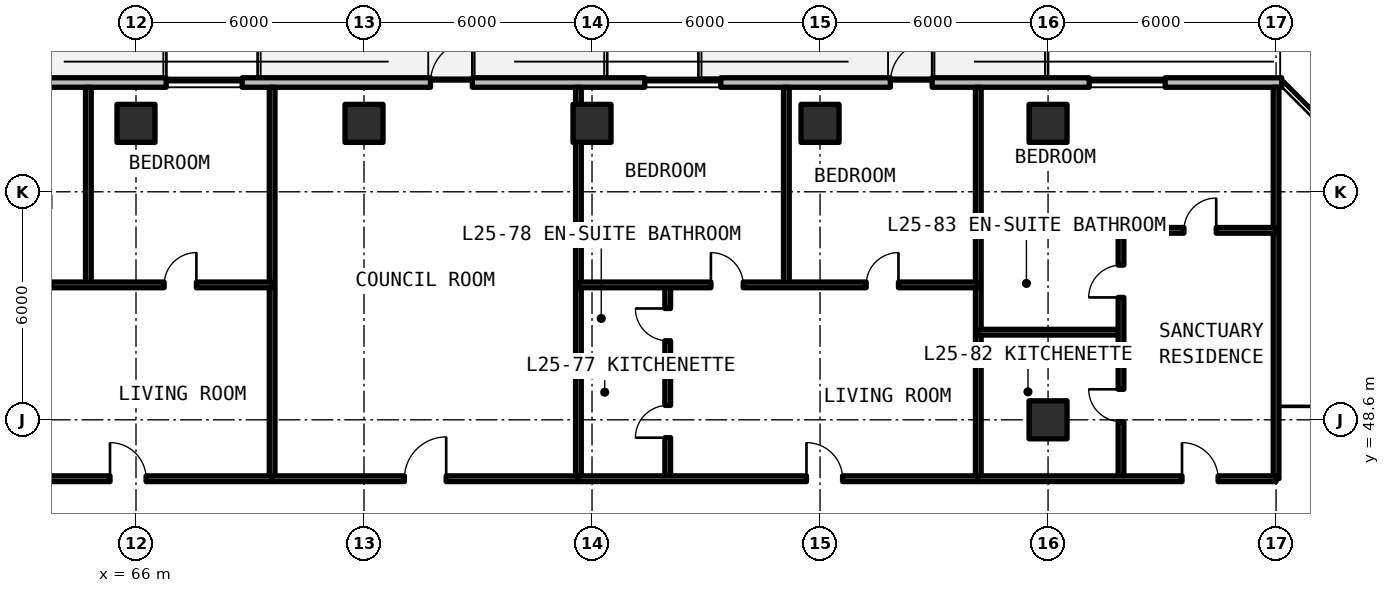
"""IFC4 building model, lengths in metres.
Left out: names, types, materials, properties, quantities, classifications, styles, units other than length and angle.
Written with IfcOpenShell. Run it as: python <this file> out.ifc"""

import sys

from ifc_helpers import new_model, si_unit, direction, frame, frame_2d, origin, origin_2d, place, context, subcontext, project, spatial, rectangle, extrude, element, fill, save


model = new_model("IFC4")
c1 = context("Model", 3, precision=1e-05, world=origin(), true_north=direction((0.0, 1.0)))
c2 = subcontext(c1, "Body", "Model", "MODEL_VIEW")
j1 = project(units=[si_unit("LENGTHUNIT", "METRE"), si_unit("PLANEANGLEUNIT", "RADIAN")], contexts=[c1])
p1 = place(None, origin())
s1 = spatial("IfcSite", under=j1, at=p1, CompositionType="ELEMENT")
p2 = place(p1, origin())
s2 = spatial("IfcBuilding", under=s1, at=p2, CompositionType="ELEMENT")
p3 = place(p2, frame((0.0, 0.0, 92.07)))
s3 = spatial("IfcBuildingStorey", under=s2, at=p3, CompositionType="ELEMENT", Elevation=92.07)
for number, where, z_axis, x_axis in (
    (1, (90.0, 48.6, 0.0), (0.0, 0.0, 1.0), (1.0, 0.0, 0.0)),
    (2, (66.0, 56.4, 0.0), (0.0, 0.0, 1.0), (1.0, 0.0, 0.0)),
    (3, (72.0, 56.4, 0.0), (0.0, 0.0, 1.0), (1.0, 0.0, 0.0)),
    (4, (78.0, 56.4, 0.0), (0.0, 0.0, 1.0), (1.0, 0.0, 0.0)),
    (5, (84.0, 56.4, 0.0), (0.0, 0.0, 1.0), (1.0, 0.0, 0.0)),
    (6, (90.0, 56.4, 0.0), (0.0, 0.0, 1.0), (1.0, 0.0, 0.0)),
):
    element("IfcColumn", number, at=place(p3, frame(where, z_axis=z_axis, x_axis=x_axis)), inside=s3, PredefinedType="COLUMN", context=c2, shape_type="SweptSolid", body=[
        extrude(rectangle(XDim=1.0, YDim=1.0, at=origin_2d()), origin(), (0.0, 0.0, 1.0), 3.3),
    ])
p4 = place(p3, frame((96.148, 57.475, 0.0), z_axis=(0.0, 0.0, 1.0), x_axis=(-1.0, 0.0, 0.0)))
e7 = element("IfcWall", 7, at=p4, inside=s3, PredefinedType="SOLIDWALL", context=c2, shape_type="SweptSolid", body=[
    extrude(rectangle(XDim=44.023, YDim=0.25, at=frame_2d((22.012, 0.0))), origin(), (0.0, 0.0, 1.0), 3.08),
])
p5 = place(p4, frame((33.148, 0.0, 0.0)))
e8 = element("IfcOpeningElement", 8, at=p5, cuts=e7, PredefinedType="OPENING", context=c2, shape_type="SweptSolid", body=[
    extrude(rectangle(XDim=1.1, YDim=2.15, at=frame_2d((0.55, 1.075))), frame((0.0, 0.135, 0.0), z_axis=(0.0, -1.0, 0.0), x_axis=(1.0, 0.0, 0.0)), (0.0, 0.0, 1.0), 0.27),
])
p6 = place(p4, frame((21.298, 0.0, 0.0)))
e9 = element("IfcOpeningElement", 9, at=p6, cuts=e7, PredefinedType="OPENING", context=c2, shape_type="SweptSolid", body=[
    extrude(rectangle(XDim=1.1, YDim=2.15, at=frame_2d((0.55, 1.075))), frame((0.0, 0.135, 0.0), z_axis=(0.0, -1.0, 0.0), x_axis=(1.0, 0.0, 0.0)), (0.0, 0.0, 1.0), 0.27),
])
p7 = place(p4, frame((9.198, 0.0, 0.0)))
e10 = element("IfcOpeningElement", 10, at=p7, cuts=e7, PredefinedType="OPENING", context=c2, shape_type="SweptSolid", body=[
    extrude(rectangle(XDim=1.1, YDim=2.15, at=frame_2d((0.55, 1.075))), frame((0.0, 0.135, 0.0), z_axis=(0.0, -1.0, 0.0), x_axis=(1.0, 0.0, 0.0)), (0.0, 0.0, 1.0), 0.27),
])
p8 = place(p4, frame((39.334, 0.0, 0.78)))
e11 = element("IfcOpeningElement", 11, at=p8, cuts=e7, PredefinedType="OPENING", context=c2, shape_type="SweptSolid", body=[
    extrude(rectangle(XDim=2.0, YDim=1.66, at=frame_2d((1.0, 0.83))), frame((0.0, 0.135, 0.0), z_axis=(0.0, -1.0, 0.0), x_axis=(1.0, 0.0, 0.0)), (0.0, 0.0, 1.0), 0.27),
])
p9 = place(p4, frame((27.354, 0.0, 0.78)))
e12 = element("IfcOpeningElement", 12, at=p9, cuts=e7, PredefinedType="OPENING", context=c2, shape_type="SweptSolid", body=[
    extrude(rectangle(XDim=2.0, YDim=1.66, at=frame_2d((1.0, 0.83))), frame((0.0, 0.135, 0.0), z_axis=(0.0, -1.0, 0.0), x_axis=(1.0, 0.0, 0.0)), (0.0, 0.0, 1.0), 0.27),
])
p10 = place(p4, frame((14.76, 0.0, 0.78)))
e13 = element("IfcOpeningElement", 13, at=p10, cuts=e7, PredefinedType="OPENING", context=c2, shape_type="SweptSolid", body=[
    extrude(rectangle(XDim=2.0, YDim=1.66, at=frame_2d((1.0, 0.83))), frame((0.0, 0.135, 0.0), z_axis=(0.0, -1.0, 0.0), x_axis=(1.0, 0.0, 0.0)), (0.0, 0.0, 1.0), 0.27),
])
p11 = place(p4, frame((3.066, 0.0, 0.78)))
e14 = element("IfcOpeningElement", 14, at=p11, cuts=e7, PredefinedType="OPENING", context=c2, shape_type="SweptSolid", body=[
    extrude(rectangle(XDim=2.0, YDim=1.66, at=frame_2d((1.0, 0.83))), frame((0.0, 0.135, 0.0), z_axis=(0.0, -1.0, 0.0), x_axis=(1.0, 0.0, 0.0)), (0.0, 0.0, 1.0), 0.27),
])
for number, where, z_axis, x_axis in (
    (15, (96.0, 47.05, 0.0), (0.0, 0.0, 1.0), (0.0, 1.0, 0.0)),
    (16, (69.583, 47.05, 0.0), (0.0, 0.0, 1.0), (0.0, 1.0, 0.0)),
):
    element("IfcWall", number, at=place(p3, frame(where, z_axis=z_axis, x_axis=x_axis)), inside=s3, PredefinedType="SOLIDWALL", context=c2, shape_type="SweptSolid", body=[
        extrude(rectangle(XDim=10.3, YDim=0.15, at=frame_2d((5.15, 0.0))), origin(), (0.0, 0.0, 1.0), 2.35),
    ])
p12 = place(p3, frame((64.747, 52.15, 0.0), z_axis=(0.0, 0.0, 1.0), x_axis=(0.0, 1.0, 0.0)))
e17 = element("IfcWall", 17, at=p12, inside=s3, PredefinedType="PARTITIONING", context=c2, shape_type="SweptSolid", body=[
    extrude(rectangle(XDim=5.2, YDim=0.15, at=frame_2d((2.6, 0.0))), origin(), (0.0, 0.0, 1.0), 2.35),
])
p13 = place(p3, frame((59.508, 52.15, 0.0), z_axis=(0.0, 0.0, 1.0), x_axis=(1.0, 0.0, 0.0)))
e18 = element("IfcWall", 18, at=p13, inside=s3, PredefinedType="PARTITIONING", context=c2, shape_type="SweptSolid", body=[
    extrude(rectangle(XDim=10.074, YDim=0.15, at=frame_2d((5.037, 0.0))), origin(), (0.0, 0.0, 1.0), 2.35),
])
p14 = place(p13, frame((3.4, 0.0, 0.0)))
e19 = element("IfcOpeningElement", 19, at=p14, cuts=e18, PredefinedType="OPENING", context=c2, shape_type="SweptSolid", body=[
    extrude(rectangle(XDim=0.85, YDim=2.1, at=frame_2d((0.425, 1.05))), frame((0.0, 0.085, 0.0), z_axis=(0.0, -1.0, 0.0), x_axis=(1.0, 0.0, 0.0)), (0.0, 0.0, 1.0), 0.17),
])
p15 = place(p13, frame((7.232, 0.0, 0.0)))
e20 = element("IfcOpeningElement", 20, at=p15, cuts=e18, PredefinedType="OPENING", context=c2, shape_type="SweptSolid", body=[
    extrude(rectangle(XDim=0.85, YDim=2.1, at=frame_2d((0.425, 1.05))), frame((0.0, 0.085, 0.0), z_axis=(0.0, -1.0, 0.0), x_axis=(1.0, 0.0, 0.0)), (0.0, 0.0, 1.0), 0.17),
])
p16 = place(p3, frame((59.508, 47.05, 0.0), z_axis=(0.0, 0.0, 1.0), x_axis=(1.0, 0.0, 0.0)))
e21 = element("IfcWall", 21, at=p16, inside=s3, PredefinedType="SOLIDWALL", context=c2, shape_type="SweptSolid", body=[
    extrude(rectangle(XDim=10.074, YDim=0.15, at=frame_2d((5.037, 0.0))), origin(), (0.0, 0.0, 1.0), 2.35),
])
p17 = place(p16, frame((5.808, 0.0, 0.0)))
e22 = element("IfcOpeningElement", 22, at=p17, cuts=e21, PredefinedType="OPENING", context=c2, shape_type="SweptSolid", body=[
    extrude(rectangle(XDim=0.95, YDim=2.15, at=frame_2d((0.475, 1.075))), frame((0.0, 0.085, 0.0), z_axis=(0.0, -1.0, 0.0), x_axis=(1.0, 0.0, 0.0)), (0.0, 0.0, 1.0), 0.17),
])
p18 = place(p3, frame((77.642, 47.05, 0.0), z_axis=(0.0, 0.0, 1.0), x_axis=(0.0, 1.0, 0.0)))
e23 = element("IfcWall", 23, at=p18, inside=s3, PredefinedType="SOLIDWALL", context=c2, shape_type="SweptSolid", body=[
    extrude(rectangle(XDim=10.3, YDim=0.15, at=frame_2d((5.15, 0.0))), origin(), (0.0, 0.0, 1.0), 2.35),
])
p19 = place(p3, frame((69.583, 47.05, 0.0), z_axis=(0.0, 0.0, 1.0), x_axis=(1.0, 0.0, 0.0)))
e24 = element("IfcWall", 24, at=p19, inside=s3, PredefinedType="SOLIDWALL", context=c2, shape_type="SweptSolid", body=[
    extrude(rectangle(XDim=8.06, YDim=0.15, at=frame_2d((4.03, 0.0))), origin(), (0.0, 0.0, 1.0), 2.35),
])
p20 = place(p19, frame((3.48, 0.0, 0.0)))
e25 = element("IfcOpeningElement", 25, at=p20, cuts=e24, PredefinedType="OPENING", context=c2, shape_type="SweptSolid", body=[
    extrude(rectangle(XDim=1.1, YDim=2.15, at=frame_2d((0.55, 1.075))), frame((0.0, 0.085, 0.0), z_axis=(0.0, -1.0, 0.0), x_axis=(1.0, 0.0, 0.0)), (0.0, 0.0, 1.0), 0.17),
])
p21 = place(p3, frame((88.164, 47.05, 0.0), z_axis=(0.0, 0.0, 1.0), x_axis=(0.0, 1.0, 0.0)))
e26 = element("IfcWall", 26, at=p21, inside=s3, PredefinedType="SOLIDWALL", context=c2, shape_type="SweptSolid", body=[
    extrude(rectangle(XDim=10.3, YDim=0.15, at=frame_2d((5.15, 0.0))), origin(), (0.0, 0.0, 1.0), 2.35),
])
p22 = place(p3, frame((77.642, 50.059, 0.0), z_axis=(0.0, 0.0, 1.0), x_axis=(1.0, 0.0, 0.0)))
e27 = element("IfcWall", 27, at=p22, inside=s3, PredefinedType="PARTITIONING", context=c2, shape_type="SweptSolid", body=[
    extrude(rectangle(XDim=2.35, YDim=0.15, at=frame_2d((1.175, 0.0))), origin(), (0.0, 0.0, 1.0), 2.35),
])
p23 = place(p3, frame((79.992, 47.05, 0.0), z_axis=(0.0, 0.0, 1.0), x_axis=(0.0, 1.0, 0.0)))
e28 = element("IfcWall", 28, at=p23, inside=s3, PredefinedType="PARTITIONING", context=c2, shape_type="SweptSolid", body=[
    extrude(rectangle(XDim=5.1, YDim=0.15, at=frame_2d((2.55, 0.0))), origin(), (0.0, 0.0, 1.0), 2.35),
])
p24 = place(p23, frame((1.08, 0.0, 0.0)))
e29 = element("IfcOpeningElement", 29, at=p24, cuts=e28, PredefinedType="OPENING", context=c2, shape_type="SweptSolid", body=[
    extrude(rectangle(XDim=0.85, YDim=2.1, at=frame_2d((0.425, 1.05))), frame((0.0, 0.085, 0.0), z_axis=(0.0, -1.0, 0.0), x_axis=(1.0, 0.0, 0.0)), (0.0, 0.0, 1.0), 0.17),
])
p25 = place(p23, frame((3.629, 0.0, 0.0)))
e30 = element("IfcOpeningElement", 30, at=p25, cuts=e28, PredefinedType="OPENING", context=c2, shape_type="SweptSolid", body=[
    extrude(rectangle(XDim=0.85, YDim=2.1, at=frame_2d((0.425, 1.05))), frame((0.0, 0.085, 0.0), z_axis=(0.0, -1.0, 0.0), x_axis=(1.0, 0.0, 0.0)), (0.0, 0.0, 1.0), 0.17),
])
p26 = place(p3, frame((83.114, 52.15, 0.0), z_axis=(0.0, 0.0, 1.0), x_axis=(0.0, 1.0, 0.0)))
e31 = element("IfcWall", 31, at=p26, inside=s3, PredefinedType="PARTITIONING", context=c2, shape_type="SweptSolid", body=[
    extrude(rectangle(XDim=5.2, YDim=0.15, at=frame_2d((2.6, 0.0))), origin(), (0.0, 0.0, 1.0), 2.35),
])
p27 = place(p3, frame((77.642, 52.15, 0.0), z_axis=(0.0, 0.0, 1.0), x_axis=(1.0, 0.0, 0.0)))
e32 = element("IfcWall", 32, at=p27, inside=s3, PredefinedType="PARTITIONING", context=c2, shape_type="SweptSolid", body=[
    extrude(rectangle(XDim=10.522, YDim=0.15, at=frame_2d((5.261, 0.0))), origin(), (0.0, 0.0, 1.0), 2.35),
])
p28 = place(p27, frame((3.486, 0.0, 0.0)))
e33 = element("IfcOpeningElement", 33, at=p28, cuts=e32, PredefinedType="OPENING", context=c2, shape_type="SweptSolid", body=[
    extrude(rectangle(XDim=0.85, YDim=2.1, at=frame_2d((0.425, 1.05))), frame((0.0, 0.085, 0.0), z_axis=(0.0, -1.0, 0.0), x_axis=(1.0, 0.0, 0.0)), (0.0, 0.0, 1.0), 0.17),
])
p29 = place(p27, frame((7.572, 0.0, 0.0)))
e34 = element("IfcOpeningElement", 34, at=p29, cuts=e32, PredefinedType="OPENING", context=c2, shape_type="SweptSolid", body=[
    extrude(rectangle(XDim=0.85, YDim=2.1, at=frame_2d((0.425, 1.05))), frame((0.0, 0.085, 0.0), z_axis=(0.0, -1.0, 0.0), x_axis=(1.0, 0.0, 0.0)), (0.0, 0.0, 1.0), 0.17),
])
p30 = place(p3, frame((77.642, 47.05, 0.0), z_axis=(0.0, 0.0, 1.0), x_axis=(1.0, 0.0, 0.0)))
e35 = element("IfcWall", 35, at=p30, inside=s3, PredefinedType="SOLIDWALL", context=c2, shape_type="SweptSolid", body=[
    extrude(rectangle(XDim=10.522, YDim=0.15, at=frame_2d((5.261, 0.0))), origin(), (0.0, 0.0, 1.0), 2.35),
])
p31 = place(p30, frame((6.001, 0.0, 0.0)))
e36 = element("IfcOpeningElement", 36, at=p31, cuts=e35, PredefinedType="OPENING", context=c2, shape_type="SweptSolid", body=[
    extrude(rectangle(XDim=0.95, YDim=2.15, at=frame_2d((0.475, 1.075))), frame((0.0, 0.085, 0.0), z_axis=(0.0, -1.0, 0.0), x_axis=(1.0, 0.0, 0.0)), (0.0, 0.0, 1.0), 0.17),
])
p32 = place(p3, frame((88.164, 50.906, 0.0), z_axis=(0.0, 0.0, 1.0), x_axis=(1.0, 0.0, 0.0)))
e37 = element("IfcWall", 37, at=p32, inside=s3, PredefinedType="PARTITIONING", context=c2, shape_type="SweptSolid", body=[
    extrude(rectangle(XDim=3.756, YDim=0.15, at=frame_2d((1.878, 0.0))), origin(), (0.0, 0.0, 1.0), 2.35),
])
p33 = place(p3, frame((91.92, 47.05, 0.0), z_axis=(0.0, 0.0, 1.0), x_axis=(0.0, 1.0, 0.0)))
e38 = element("IfcWall", 38, at=p33, inside=s3, PredefinedType="PARTITIONING", context=c2, shape_type="SweptSolid", body=[
    extrude(rectangle(XDim=6.535, YDim=0.15, at=frame_2d((3.268, 0.0))), origin(), (0.0, 0.0, 1.0), 2.35),
])
p34 = place(p33, frame((1.503, 0.0, 0.0)))
e39 = element("IfcOpeningElement", 39, at=p34, cuts=e38, PredefinedType="OPENING", context=c2, shape_type="SweptSolid", body=[
    extrude(rectangle(XDim=0.85, YDim=2.1, at=frame_2d((0.425, 1.05))), frame((0.0, 0.085, 0.0), z_axis=(0.0, -1.0, 0.0), x_axis=(1.0, 0.0, 0.0)), (0.0, 0.0, 1.0), 0.17),
])
p35 = place(p33, frame((4.771, 0.0, 0.0)))
e40 = element("IfcOpeningElement", 40, at=p35, cuts=e38, PredefinedType="OPENING", context=c2, shape_type="SweptSolid", body=[
    extrude(rectangle(XDim=0.85, YDim=2.1, at=frame_2d((0.425, 1.05))), frame((0.0, 0.085, 0.0), z_axis=(0.0, -1.0, 0.0), x_axis=(1.0, 0.0, 0.0)), (0.0, 0.0, 1.0), 0.17),
])
p36 = place(p3, frame((88.164, 53.585, 0.0), z_axis=(0.0, 0.0, 1.0), x_axis=(1.0, 0.0, 0.0)))
e41 = element("IfcWall", 41, at=p36, inside=s3, PredefinedType="PARTITIONING", context=c2, shape_type="SweptSolid", body=[
    extrude(rectangle(XDim=7.836, YDim=0.15, at=frame_2d((3.918, 0.0))), origin(), (0.0, 0.0, 1.0), 2.35),
])
p37 = place(p36, frame((5.411, 0.0, 0.0)))
e42 = element("IfcOpeningElement", 42, at=p37, cuts=e41, PredefinedType="OPENING", context=c2, shape_type="SweptSolid", body=[
    extrude(rectangle(XDim=0.85, YDim=2.1, at=frame_2d((0.425, 1.05))), frame((0.0, 0.085, 0.0), z_axis=(0.0, -1.0, 0.0), x_axis=(1.0, 0.0, 0.0)), (0.0, 0.0, 1.0), 0.17),
])
p38 = place(p3, frame((88.164, 47.05, 0.0), z_axis=(0.0, 0.0, 1.0), x_axis=(1.0, 0.0, 0.0)))
e43 = element("IfcWall", 43, at=p38, inside=s3, PredefinedType="SOLIDWALL", context=c2, shape_type="SweptSolid", body=[
    extrude(rectangle(XDim=7.836, YDim=0.15, at=frame_2d((3.918, 0.0))), origin(), (0.0, 0.0, 1.0), 2.35),
])
p39 = place(p38, frame((5.361, 0.0, 0.0)))
e44 = element("IfcOpeningElement", 44, at=p39, cuts=e43, PredefinedType="OPENING", context=c2, shape_type="SweptSolid", body=[
    extrude(rectangle(XDim=0.95, YDim=2.15, at=frame_2d((0.475, 1.075))), frame((0.0, 0.085, 0.0), z_axis=(0.0, -1.0, 0.0), x_axis=(1.0, 0.0, 0.0)), (0.0, 0.0, 1.0), 0.17),
])
p40 = place(p6, frame((1.1, 0.0, 0.0), z_axis=(0.0, 0.0, 1.0), x_axis=(-1.0, 0.0, 0.0)))
e45 = element("IfcDoor", 45, at=p40, inside=s3, OperationType="SINGLE_SWING_LEFT", PredefinedType="DOOR", context=c2, shape_type="SweptSolid", body=[
    extrude(rectangle(XDim=1.1, YDim=2.15, at=frame_2d((0.55, 1.075))), frame((0.0, 0.025, 0.0), z_axis=(0.0, -1.0, 0.0), x_axis=(1.0, 0.0, 0.0)), (0.0, 0.0, 1.0), 0.05),
])
fill(e9, e45)
p41 = place(p7, frame((1.1, 0.0, 0.0), z_axis=(0.0, 0.0, 1.0), x_axis=(-1.0, 0.0, 0.0)))
e46 = element("IfcDoor", 46, at=p41, inside=s3, OperationType="SINGLE_SWING_RIGHT", PredefinedType="DOOR", context=c2, shape_type="SweptSolid", body=[
    extrude(rectangle(XDim=1.1, YDim=2.15, at=frame_2d((0.55, 1.075))), frame((0.0, 0.025, 0.0), z_axis=(0.0, -1.0, 0.0), x_axis=(1.0, 0.0, 0.0)), (0.0, 0.0, 1.0), 0.05),
])
fill(e10, e46)
p42 = place(p9, origin())
e47 = element("IfcWindow", 47, at=p42, inside=s3, PartitioningType="SINGLE_PANEL", PredefinedType="WINDOW", context=c2, shape_type="SweptSolid", body=[
    extrude(rectangle(XDim=2.0, YDim=1.66, at=frame_2d((1.0, 0.83))), frame((0.0, 0.03, 0.0), z_axis=(0.0, -1.0, 0.0), x_axis=(1.0, 0.0, 0.0)), (0.0, 0.0, 1.0), 0.06),
])
fill(e12, e47)
p43 = place(p10, origin())
e48 = element("IfcWindow", 48, at=p43, inside=s3, PartitioningType="SINGLE_PANEL", PredefinedType="WINDOW", context=c2, shape_type="SweptSolid", body=[
    extrude(rectangle(XDim=2.0, YDim=1.66, at=frame_2d((1.0, 0.83))), frame((0.0, 0.03, 0.0), z_axis=(0.0, -1.0, 0.0), x_axis=(1.0, 0.0, 0.0)), (0.0, 0.0, 1.0), 0.06),
])
fill(e13, e48)
p44 = place(p11, origin())
e49 = element("IfcWindow", 49, at=p44, inside=s3, PartitioningType="SINGLE_PANEL", PredefinedType="WINDOW", context=c2, shape_type="SweptSolid", body=[
    extrude(rectangle(XDim=2.0, YDim=1.66, at=frame_2d((1.0, 0.83))), frame((0.0, 0.03, 0.0), z_axis=(0.0, -1.0, 0.0), x_axis=(1.0, 0.0, 0.0)), (0.0, 0.0, 1.0), 0.06),
])
fill(e14, e49)
p45 = place(p15, origin())
e50 = element("IfcDoor", 50, at=p45, inside=s3, OperationType="SINGLE_SWING_RIGHT", PredefinedType="DOOR", context=c2, shape_type="SweptSolid", body=[
    extrude(rectangle(XDim=0.85, YDim=2.1, at=frame_2d((0.425, 1.05))), frame((0.0, 0.025, 0.0), z_axis=(0.0, -1.0, 0.0), x_axis=(1.0, 0.0, 0.0)), (0.0, 0.0, 1.0), 0.05),
])
fill(e20, e50)
p46 = place(p17, origin())
e51 = element("IfcDoor", 51, at=p46, inside=s3, OperationType="SINGLE_SWING_LEFT", PredefinedType="DOOR", context=c2, shape_type="SweptSolid", body=[
    extrude(rectangle(XDim=0.95, YDim=2.15, at=frame_2d((0.475, 1.075))), frame((0.0, 0.025, 0.0), z_axis=(0.0, -1.0, 0.0), x_axis=(1.0, 0.0, 0.0)), (0.0, 0.0, 1.0), 0.05),
])
fill(e22, e51)
p47 = place(p20, origin())
e52 = element("IfcDoor", 52, at=p47, inside=s3, OperationType="SINGLE_SWING_RIGHT", PredefinedType="DOOR", context=c2, shape_type="SweptSolid", body=[
    extrude(rectangle(XDim=1.1, YDim=2.15, at=frame_2d((0.55, 1.075))), frame((0.0, 0.025, 0.0), z_axis=(0.0, -1.0, 0.0), x_axis=(1.0, 0.0, 0.0)), (0.0, 0.0, 1.0), 0.05),
])
fill(e25, e52)
p48 = place(p24, origin())
e53 = element("IfcDoor", 53, at=p48, inside=s3, OperationType="SINGLE_SWING_LEFT", PredefinedType="DOOR", context=c2, shape_type="SweptSolid", body=[
    extrude(rectangle(XDim=0.85, YDim=2.1, at=frame_2d((0.425, 1.05))), frame((0.0, 0.025, 0.0), z_axis=(0.0, -1.0, 0.0), x_axis=(1.0, 0.0, 0.0)), (0.0, 0.0, 1.0), 0.05),
])
fill(e29, e53)
p49 = place(p25, origin())
e54 = element("IfcDoor", 54, at=p49, inside=s3, OperationType="SINGLE_SWING_RIGHT", PredefinedType="DOOR", context=c2, shape_type="SweptSolid", body=[
    extrude(rectangle(XDim=0.85, YDim=2.1, at=frame_2d((0.425, 1.05))), frame((0.0, 0.025, 0.0), z_axis=(0.0, -1.0, 0.0), x_axis=(1.0, 0.0, 0.0)), (0.0, 0.0, 1.0), 0.05),
])
fill(e30, e54)
p50 = place(p28, origin())
e55 = element("IfcDoor", 55, at=p50, inside=s3, OperationType="SINGLE_SWING_LEFT", PredefinedType="DOOR", context=c2, shape_type="SweptSolid", body=[
    extrude(rectangle(XDim=0.85, YDim=2.1, at=frame_2d((0.425, 1.05))), frame((0.0, 0.025, 0.0), z_axis=(0.0, -1.0, 0.0), x_axis=(1.0, 0.0, 0.0)), (0.0, 0.0, 1.0), 0.05),
])
fill(e33, e55)
p51 = place(p29, origin())
e56 = element("IfcDoor", 56, at=p51, inside=s3, OperationType="SINGLE_SWING_RIGHT", PredefinedType="DOOR", context=c2, shape_type="SweptSolid", body=[
    extrude(rectangle(XDim=0.85, YDim=2.1, at=frame_2d((0.425, 1.05))), frame((0.0, 0.025, 0.0), z_axis=(0.0, -1.0, 0.0), x_axis=(1.0, 0.0, 0.0)), (0.0, 0.0, 1.0), 0.05),
])
fill(e34, e56)
p52 = place(p31, origin())
e57 = element("IfcDoor", 57, at=p52, inside=s3, OperationType="SINGLE_SWING_LEFT", PredefinedType="DOOR", context=c2, shape_type="SweptSolid", body=[
    extrude(rectangle(XDim=0.95, YDim=2.15, at=frame_2d((0.475, 1.075))), frame((0.0, 0.025, 0.0), z_axis=(0.0, -1.0, 0.0), x_axis=(1.0, 0.0, 0.0)), (0.0, 0.0, 1.0), 0.05),
])
fill(e36, e57)
p53 = place(p34, origin())
e58 = element("IfcDoor", 58, at=p53, inside=s3, OperationType="SINGLE_SWING_RIGHT", PredefinedType="DOOR", context=c2, shape_type="SweptSolid", body=[
    extrude(rectangle(XDim=0.85, YDim=2.1, at=frame_2d((0.425, 1.05))), frame((0.0, 0.025, 0.0), z_axis=(0.0, -1.0, 0.0), x_axis=(1.0, 0.0, 0.0)), (0.0, 0.0, 1.0), 0.05),
])
fill(e39, e58)
p54 = place(p35, origin())
e59 = element("IfcDoor", 59, at=p54, inside=s3, OperationType="SINGLE_SWING_LEFT", PredefinedType="DOOR", context=c2, shape_type="SweptSolid", body=[
    extrude(rectangle(XDim=0.85, YDim=2.1, at=frame_2d((0.425, 1.05))), frame((0.0, 0.025, 0.0), z_axis=(0.0, -1.0, 0.0), x_axis=(1.0, 0.0, 0.0)), (0.0, 0.0, 1.0), 0.05),
])
fill(e40, e59)
p55 = place(p37, origin())
e60 = element("IfcDoor", 60, at=p55, inside=s3, OperationType="SINGLE_SWING_RIGHT", PredefinedType="DOOR", context=c2, shape_type="SweptSolid", body=[
    extrude(rectangle(XDim=0.85, YDim=2.1, at=frame_2d((0.425, 1.05))), frame((0.0, 0.025, 0.0), z_axis=(0.0, -1.0, 0.0), x_axis=(1.0, 0.0, 0.0)), (0.0, 0.0, 1.0), 0.05),
])
fill(e42, e60)
p56 = place(p39, origin())
e61 = element("IfcDoor", 61, at=p56, inside=s3, OperationType="SINGLE_SWING_LEFT", PredefinedType="DOOR", context=c2, shape_type="SweptSolid", body=[
    extrude(rectangle(XDim=0.95, YDim=2.15, at=frame_2d((0.475, 1.075))), frame((0.0, 0.025, 0.0), z_axis=(0.0, -1.0, 0.0), x_axis=(1.0, 0.0, 0.0)), (0.0, 0.0, 1.0), 0.05),
])
fill(e44, e61)
save(model, sys.argv[1])
